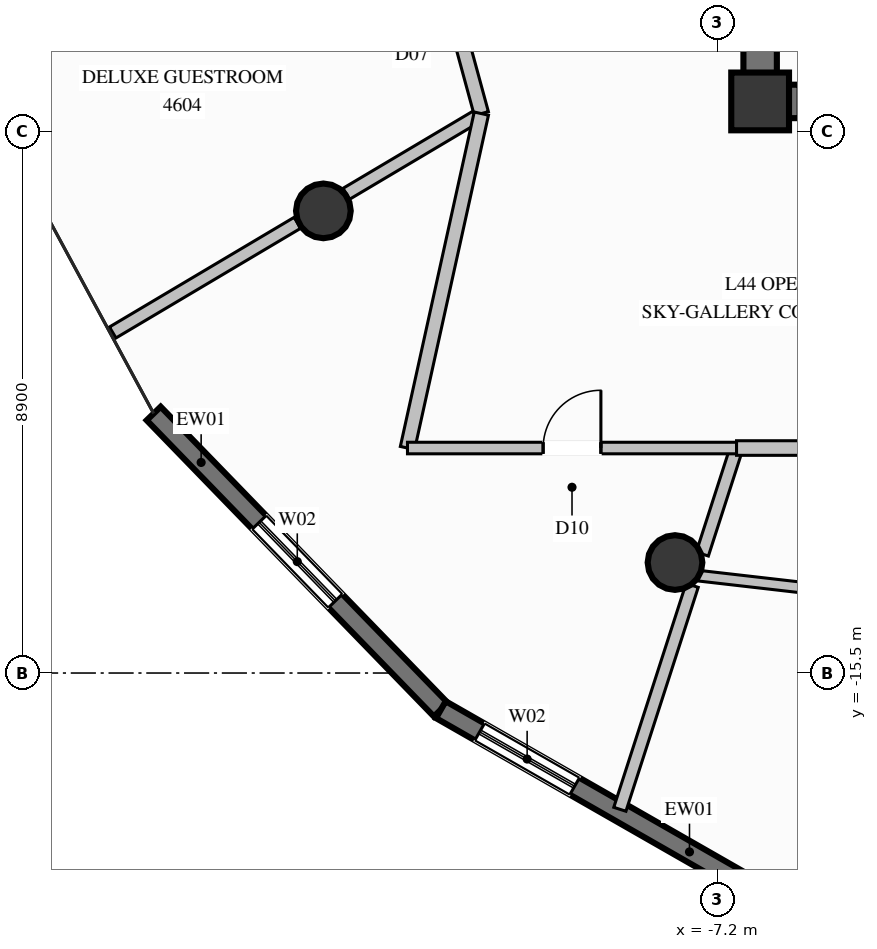
"""IFC4 building model, lengths in metres.
Left out: names, types, materials, properties, quantities, classifications, styles, units other than length and angle.
Written with IfcOpenShell. Run it as: python <this file> out.ifc"""

import sys

from ifc_helpers import new_model, si_unit, direction, frame, frame_2d, origin, origin_2d, place, context, subcontext, project, spatial, rectangle, circle, extrude, element, fill, save


model = new_model("IFC4")
c1 = context("Model", 3, precision=1e-05, world=origin(), true_north=direction((0.0, 1.0)))
c2 = subcontext(c1, "Body", "Model", "MODEL_VIEW")
j1 = project(units=[si_unit("LENGTHUNIT", "METRE"), si_unit("PLANEANGLEUNIT", "RADIAN")], contexts=[c1])
p1 = place(None, origin())
s1 = spatial("IfcSite", under=j1, at=p1, CompositionType="ELEMENT")
p2 = place(p1, origin())
s2 = spatial("IfcBuilding", under=s1, at=p2, CompositionType="ELEMENT")
p3 = place(p2, frame((0.0, 0.0, 173.2)))
s3 = spatial("IfcBuildingStorey", under=s2, at=p3, CompositionType="ELEMENT", Elevation=173.2)
p4 = place(p3, frame((-6.5, -6.1, 0.0), z_axis=(0.0, 0.0, 1.0), x_axis=(1.0, 0.0, 0.0)))
e1 = element("IfcColumn", 1, at=p4, inside=s3, PredefinedType="COLUMN", context=c2, shape_type="SweptSolid", body=[
    extrude(rectangle(XDim=0.95, YDim=0.95, at=origin_2d()), origin(), (0.0, 0.0, 1.0), 3.6),
])
p5 = place(p3, frame((-6.225, -6.1, 0.0), z_axis=(0.0, 0.0, 1.0), x_axis=(1.0, 0.0, 0.0)))
e2 = element("IfcWall", 2, at=p5, inside=s3, PredefinedType="SHEAR", context=c2, shape_type="SweptSolid", body=[
    extrude(rectangle(XDim=0.375, YDim=0.55, at=frame_2d((0.188, 0.0))), origin(), (0.0, 0.0, 1.0), 3.6),
])
p6 = place(p3, frame((-6.5, -6.375, 0.0), z_axis=(0.0, 0.0, 1.0), x_axis=(0.0, 1.0, 0.0)))
e3 = element("IfcWall", 3, at=p6, inside=s3, PredefinedType="SHEAR", context=c2, shape_type="SweptSolid", body=[
    extrude(rectangle(XDim=3.025, YDim=0.55, at=frame_2d((1.512, 0.0))), origin(), (0.0, 0.0, 1.0), 3.6),
])
for number, where, z_axis, x_axis in (
    (4, (-13.683, -7.9, 0.0), (0.0, 0.0, 1.0), (1.0, 0.0, 0.0)),
    (5, (-7.9, -13.683, 0.0), (0.0, 0.0, 1.0), (1.0, 0.0, 0.0)),
):
    element("IfcColumn", number, at=place(p3, frame(where, z_axis=z_axis, x_axis=x_axis)), inside=s3, PredefinedType="COLUMN", context=c2, shape_type="SweptSolid", body=[
        extrude(circle(Radius=0.45, at=origin_2d()), origin(), (0.0, 0.0, 1.0), 3.6),
    ])
p7 = place(p3, frame((-11.751, -16.103, 0.0), z_axis=(0.0, 0.0, 1.0), x_axis=(-0.696119985346, 0.71792545992, 0.0)))
e6 = element("IfcWall", 6, at=p7, inside=s3, PredefinedType="SOLIDWALL", context=c2, shape_type="SweptSolid", body=[
    extrude(rectangle(XDim=6.785, YDim=0.32, at=frame_2d((3.393, 0.0))), origin(), (0.0, 0.0, 1.0), 3.36),
])
p8 = place(p7, frame((2.492, 0.0, 0.35)))
e7 = element("IfcOpeningElement", 7, at=p8, cuts=e6, PredefinedType="OPENING", context=c2, shape_type="SweptSolid", body=[
    extrude(rectangle(XDim=1.8, YDim=2.6, at=frame_2d((0.9, 1.3))), frame((0.0, 0.17, 0.0), z_axis=(0.0, -1.0, 0.0), x_axis=(1.0, 0.0, 0.0)), (0.0, 0.0, 1.0), 0.34),
])
p9 = place(p3, frame((-5.99, -19.398, 0.0), z_axis=(0.0, 0.0, 1.0), x_axis=(-0.868052920032, 0.496471678974, 0.0)))
e8 = element("IfcWall", 8, at=p9, inside=s3, PredefinedType="SOLIDWALL", context=c2, shape_type="SweptSolid", body=[
    extrude(rectangle(XDim=6.637, YDim=0.32, at=frame_2d((3.318, 0.0))), origin(), (0.0, 0.0, 1.0), 3.36),
])
p10 = place(p9, frame((4.102, 0.0, 0.35)))
e9 = element("IfcOpeningElement", 9, at=p10, cuts=e8, PredefinedType="OPENING", context=c2, shape_type="SweptSolid", body=[
    extrude(rectangle(XDim=1.8, YDim=2.6, at=frame_2d((0.9, 1.3))), frame((0.0, 0.17, 0.0), z_axis=(0.0, -1.0, 0.0), x_axis=(1.0, 0.0, 0.0)), (0.0, 0.0, 1.0), 0.34),
])
p11 = place(p3, frame((-11.085, -6.3, 0.0), z_axis=(0.0, 0.0, 1.0), x_axis=(-0.859827513331, -0.510584613281, 0.0)))
e10 = element("IfcWall", 10, at=p11, inside=s3, PredefinedType="PARTITIONING", context=c2, shape_type="SweptSolid", body=[
    extrude(rectangle(XDim=2.583, YDim=0.21, at=frame_2d((1.292, 0.0))), origin(), (0.0, 0.0, 1.0), 2.801),
])
p12 = place(p3, frame((-14.11, -8.096, 0.0), z_axis=(0.0, 0.0, 1.0), x_axis=(-0.859825355727, -0.510588246682, 0.0)))
e11 = element("IfcWall", 11, at=p12, inside=s3, PredefinedType="PARTITIONING", context=c2, shape_type="SweptSolid", body=[
    extrude(rectangle(XDim=3.533, YDim=0.21, at=frame_2d((1.767, 0.0))), origin(), (0.0, 0.0, 1.0), 3.36),
])
p13 = place(p3, frame((-12.08, -2.646, 0.0), z_axis=(0.0, 0.0, 1.0), x_axis=(0.262762825819, -0.964860454868, 0.0)))
e12 = element("IfcWall", 12, at=p13, inside=s3, PredefinedType="PARTITIONING", context=c2, shape_type="SweptSolid", body=[
    extrude(rectangle(XDim=3.787, YDim=0.24, at=frame_2d((1.894, 0.0))), origin(), (0.0, 0.0, 1.0), 3.36),
])
p14 = place(p13, frame((1.394, 0.0, 0.0)))
e13 = element("IfcOpeningElement", 13, at=p14, cuts=e12, PredefinedType="OPENING", context=c2, shape_type="SweptSolid", body=[
    extrude(rectangle(XDim=1.0, YDim=2.2, at=frame_2d((0.5, 1.1))), frame((0.0, 0.13, 0.0), z_axis=(0.0, -1.0, 0.0), x_axis=(1.0, 0.0, 0.0)), (0.0, 0.0, 1.0), 0.26),
])
p15 = place(p3, frame((-6.888, -11.8, 0.0), z_axis=(0.0, 0.0, 1.0), x_axis=(-0.307220756357, -0.95163827522, 0.0)))
e14 = element("IfcWall", 14, at=p15, inside=s3, PredefinedType="PARTITIONING", context=c2, shape_type="SweptSolid", body=[
    extrude(rectangle(XDim=1.833, YDim=0.21, at=frame_2d((0.916, 0.0))), origin(), (0.0, 0.0, 1.0), 2.801),
])
p16 = place(p3, frame((-7.618, -14.059, 0.0), z_axis=(0.0, 0.0, 1.0), x_axis=(-0.307297747986, -0.9516134163, 0.0)))
e15 = element("IfcWall", 15, at=p16, inside=s3, PredefinedType="PARTITIONING", context=c2, shape_type="SweptSolid", body=[
    extrude(rectangle(XDim=3.869, YDim=0.21, at=frame_2d((1.935, 0.0))), origin(), (0.0, 0.0, 1.0), 3.36),
])
p17 = place(p3, frame((-11.085, -6.3, 0.0), z_axis=(0.0, 0.0, 1.0), x_axis=(-0.21572328796, -0.976454537104, 0.0)))
e16 = element("IfcWall", 16, at=p17, inside=s3, PredefinedType="PARTITIONING", context=c2, shape_type="SweptSolid", body=[
    extrude(rectangle(XDim=5.633, YDim=0.24, at=frame_2d((2.816, 0.0))), origin(), (0.0, 0.0, 1.0), 3.36),
])
p18 = place(p3, frame((-12.3, -11.8, 0.0), z_axis=(0.0, 0.0, 1.0), x_axis=(1.0, 0.0, 0.0)))
e17 = element("IfcWall", 17, at=p18, inside=s3, PredefinedType="PARTITIONING", context=c2, shape_type="SweptSolid", body=[
    extrude(rectangle(XDim=5.412, YDim=0.19, at=frame_2d((2.706, 0.0))), origin(), (0.0, 0.0, 1.0), 3.36),
])
p19 = place(p18, frame((2.231, 0.0, 0.0)))
e18 = element("IfcOpeningElement", 18, at=p19, cuts=e17, PredefinedType="OPENING", context=c2, shape_type="SweptSolid", body=[
    extrude(rectangle(XDim=0.95, YDim=2.1, at=frame_2d((0.475, 1.05))), frame((0.0, 0.105, 0.0), z_axis=(0.0, -1.0, 0.0), x_axis=(1.0, 0.0, 0.0)), (0.0, 0.0, 1.0), 0.21),
])
p20 = place(p3, frame((-6.888, -11.8, 0.0), z_axis=(0.0, 0.0, 1.0), x_axis=(1.0, 0.0, 0.0)))
e19 = element("IfcWall", 19, at=p20, inside=s3, PredefinedType="PARTITIONING", context=c2, shape_type="SweptSolid", body=[
    extrude(rectangle(XDim=3.031, YDim=0.24, at=frame_2d((1.516, 0.0))), origin(), (0.0, 0.0, 1.0), 3.36),
])
p21 = place(p3, frame((-7.564, -13.893, 0.0), z_axis=(0.0, 0.0, 1.0), x_axis=(0.993452151759, -0.114248948203, 0.0)))
e20 = element("IfcWall", 20, at=p21, inside=s3, PredefinedType="PLUMBINGWALL", context=c2, shape_type="SweptSolid", body=[
    extrude(rectangle(XDim=3.755, YDim=0.175, at=frame_2d((1.877, 0.0))), origin(), (0.0, 0.0, 1.0), 2.929),
])
p22 = place(p8, origin())
e21 = element("IfcWindow", 21, at=p22, inside=s3, PartitioningType="SINGLE_PANEL", PredefinedType="WINDOW", context=c2, shape_type="SweptSolid", body=[
    extrude(rectangle(XDim=1.8, YDim=2.6, at=frame_2d((0.9, 1.3))), frame((0.0, 0.03, 0.0), z_axis=(0.0, -1.0, 0.0), x_axis=(1.0, 0.0, 0.0)), (0.0, 0.0, 1.0), 0.06),
])
fill(e7, e21)
p23 = place(p10, origin())
e22 = element("IfcWindow", 22, at=p23, inside=s3, PartitioningType="SINGLE_PANEL", PredefinedType="WINDOW", context=c2, shape_type="SweptSolid", body=[
    extrude(rectangle(XDim=1.8, YDim=2.6, at=frame_2d((0.9, 1.3))), frame((0.0, 0.03, 0.0), z_axis=(0.0, -1.0, 0.0), x_axis=(1.0, 0.0, 0.0)), (0.0, 0.0, 1.0), 0.06),
])
fill(e9, e22)
p24 = place(p19, origin())
e23 = element("IfcDoor", 23, at=p24, inside=s3, OperationType="SINGLE_SWING_RIGHT", PredefinedType="DOOR", context=c2, shape_type="SweptSolid", body=[
    extrude(rectangle(XDim=0.95, YDim=2.1, at=frame_2d((0.475, 1.05))), frame((0.0, 0.025, 0.0), z_axis=(0.0, -1.0, 0.0), x_axis=(1.0, 0.0, 0.0)), (0.0, 0.0, 1.0), 0.05),
])
fill(e18, e23)
save(model, sys.argv[1])
